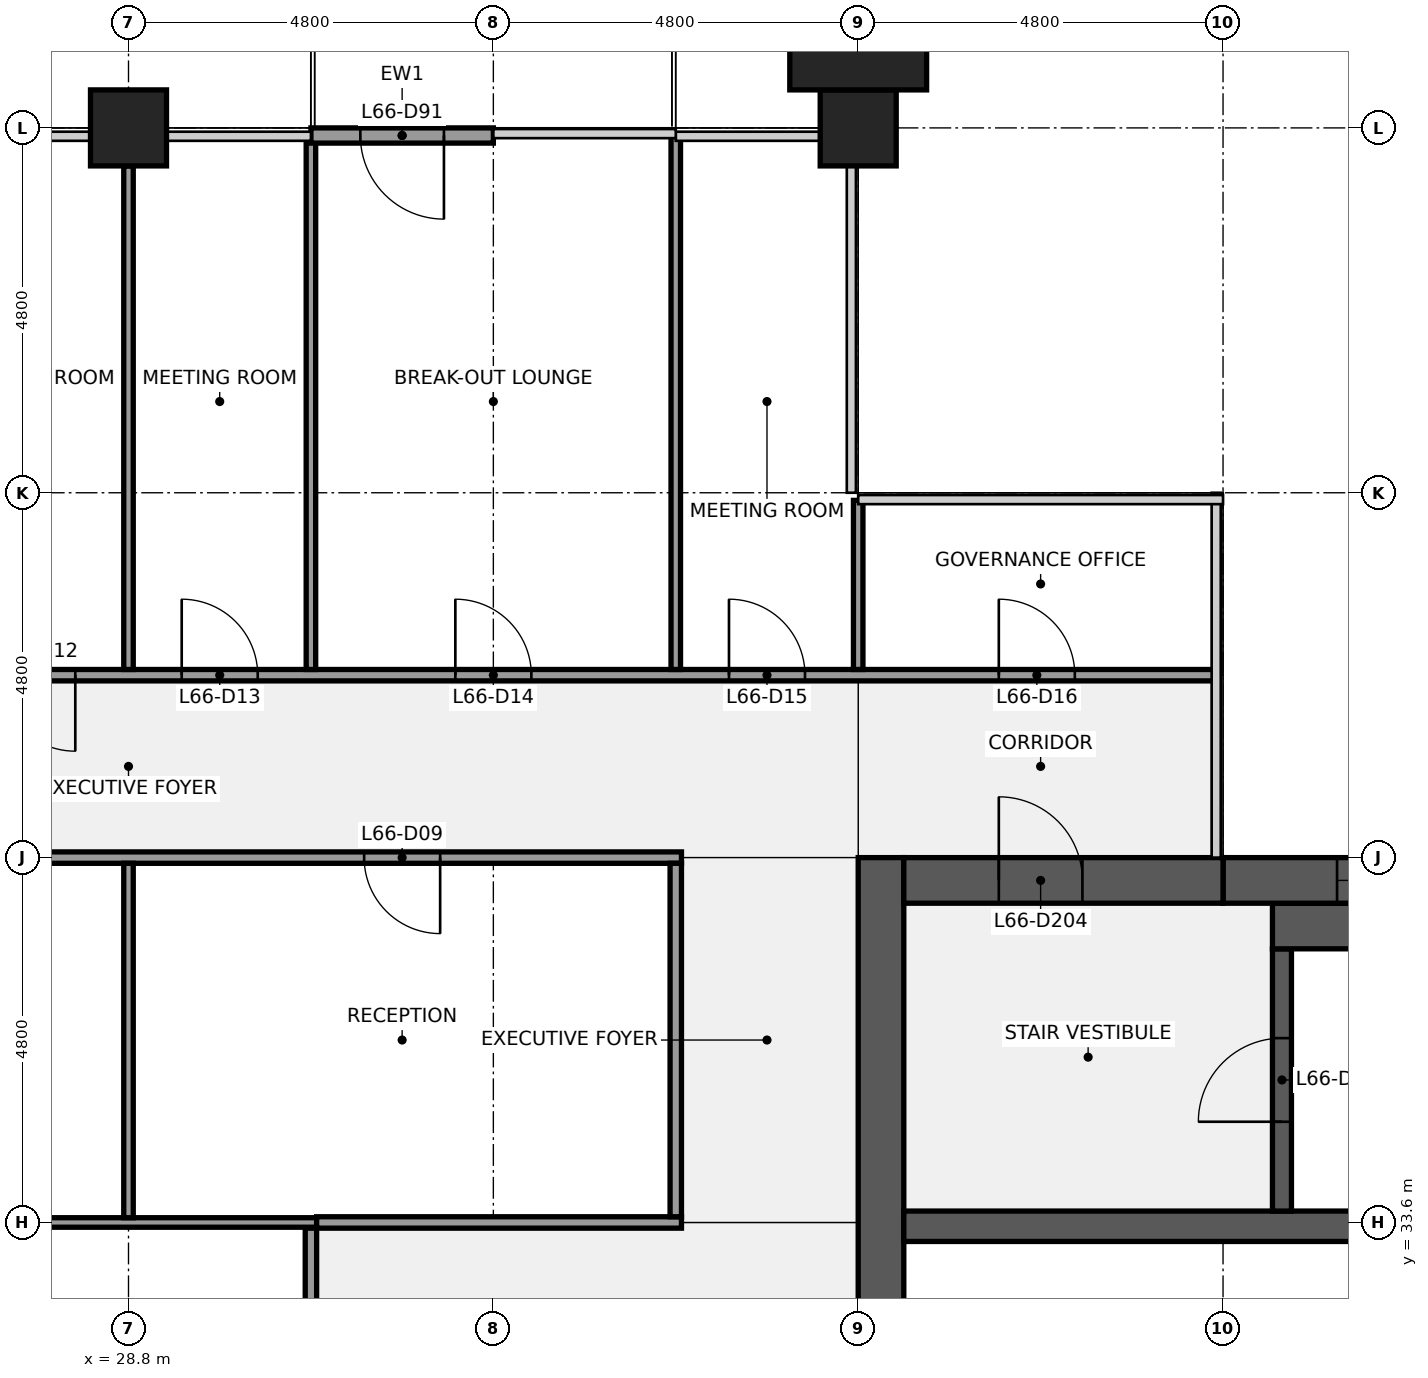
"""IFC4 building model, lengths in metres.
Left out: names, types, materials, properties, quantities, classifications, styles, units other than length and angle.
Written with IfcOpenShell. Run it as: python <this file> out.ifc"""

import sys

from ifc_helpers import new_model, si_unit, direction, frame, frame_2d, origin, origin_2d, place, context, subcontext, project, spatial, rectangle, extrude, element, fill, save


model = new_model("IFC4")
c1 = context("Model", 3, precision=1e-05, world=origin(), true_north=direction((0.0, 1.0)))
c2 = subcontext(c1, "Body", "Model", "MODEL_VIEW")
j1 = project(units=[si_unit("LENGTHUNIT", "METRE"), si_unit("PLANEANGLEUNIT", "RADIAN")], contexts=[c1])
p1 = place(None, origin())
s1 = spatial("IfcSite", under=j1, at=p1, CompositionType="ELEMENT")
p2 = place(p1, origin())
s2 = spatial("IfcBuilding", under=s1, at=p2, CompositionType="ELEMENT")
p3 = place(p2, frame((0.0, 0.0, 302.3)))
s3 = spatial("IfcBuildingStorey", under=s2, at=p3, CompositionType="ELEMENT", Elevation=302.3)
for number, where, z_axis, x_axis in (
    (1, (28.8, 48.0, 0.0), (0.0, 0.0, 1.0), (1.0, 0.0, 0.0)),
    (2, (38.4, 48.0, 0.0), (0.0, 0.0, 1.0), (1.0, 0.0, 0.0)),
):
    element("IfcColumn", number, at=place(p3, frame(where, z_axis=z_axis, x_axis=x_axis)), inside=s3, PredefinedType="COLUMN", context=c2, shape_type="SweptSolid", body=[
        extrude(rectangle(XDim=1.0, YDim=1.0, at=origin_2d()), origin(), (0.0, 0.0, 1.0), 4.0),
    ])
p4 = place(p3, frame((38.7, 9.6, 0.0), z_axis=(0.0, 0.0, 1.0), x_axis=(0.0, 1.0, 0.0)))
e3 = element("IfcWall", 3, at=p4, inside=s3, PredefinedType="SHEAR", context=c2, shape_type="SweptSolid", body=[
    extrude(rectangle(XDim=28.8, YDim=0.6, at=frame_2d((14.4, 0.0))), origin(), (0.0, 0.0, 1.0), 3.84),
])
p5 = place(p4, frame((8.7, 0.0, 0.0)))
e4 = element("IfcOpeningElement", 4, at=p5, cuts=e3, PredefinedType="OPENING", context=c2, shape_type="SweptSolid", body=[
    extrude(rectangle(XDim=1.8, YDim=2.1, at=frame_2d((0.9, 1.05))), frame((0.0, 0.31, 0.0), z_axis=(0.0, -1.0, 0.0), x_axis=(1.0, 0.0, 0.0)), (0.0, 0.0, 1.0), 0.62),
])
p6 = place(p4, frame((18.3, 0.0, 0.0)))
e5 = element("IfcOpeningElement", 5, at=p6, cuts=e3, PredefinedType="OPENING", context=c2, shape_type="SweptSolid", body=[
    extrude(rectangle(XDim=1.8, YDim=2.1, at=frame_2d((0.9, 1.05))), frame((0.0, 0.31, 0.0), z_axis=(0.0, -1.0, 0.0), x_axis=(1.0, 0.0, 0.0)), (0.0, 0.0, 1.0), 0.62),
])
p7 = place(p3, frame((39.0, 33.55, 0.0), z_axis=(0.0, 0.0, 1.0), x_axis=(1.0, 0.0, 0.0)))
e6 = element("IfcWall", 6, at=p7, inside=s3, PredefinedType="SHEAR", context=c2, shape_type="SweptSolid", body=[
    extrude(rectangle(XDim=18.0, YDim=0.4, at=frame_2d((9.0, 0.0))), origin(), (0.0, 0.0, 1.0), 3.84),
])
p8 = place(p3, frame((43.975, 33.75, 0.0), z_axis=(0.0, 0.0, 1.0), x_axis=(0.0, 1.0, 0.0)))
e7 = element("IfcWall", 7, at=p8, inside=s3, PredefinedType="SHEAR", context=c2, shape_type="SweptSolid", body=[
    extrude(rectangle(XDim=3.45, YDim=0.25, at=frame_2d((1.725, 0.0))), origin(), (0.0, 0.0, 1.0), 3.84),
])
p9 = place(p8, frame((1.175, 0.0, 0.0)))
e8 = element("IfcOpeningElement", 8, at=p9, cuts=e7, PredefinedType="OPENING", context=c2, shape_type="SweptSolid", body=[
    extrude(rectangle(XDim=1.1, YDim=2.1, at=frame_2d((0.55, 1.05))), frame((0.0, 0.135, 0.0), z_axis=(0.0, -1.0, 0.0), x_axis=(1.0, 0.0, 0.0)), (0.0, 0.0, 1.0), 0.27),
])
p10 = place(p3, frame((43.85, 37.5, 0.0), z_axis=(0.0, 0.0, 1.0), x_axis=(1.0, 0.0, 0.0)))
e9 = element("IfcWall", 9, at=p10, inside=s3, PredefinedType="SHEAR", context=c2, shape_type="SweptSolid", body=[
    extrude(rectangle(XDim=7.5, YDim=0.6, at=frame_2d((3.75, 0.0))), origin(), (0.0, 0.0, 1.0), 3.84),
])
p11 = place(p3, frame((43.2, 38.1, 0.0), z_axis=(0.0, 0.0, 1.0), x_axis=(1.0, 0.0, 0.0)))
e10 = element("IfcWall", 10, at=p11, inside=s3, PredefinedType="SHEAR", context=c2, shape_type="SweptSolid", body=[
    extrude(rectangle(XDim=13.8, YDim=0.6, at=frame_2d((6.9, 0.0))), origin(), (0.0, 0.0, 1.0), 3.84),
])
p12 = place(p11, frame((6.3, 0.0, 0.9)))
e11 = element("IfcOpeningElement", 11, at=p12, cuts=e10, PredefinedType="OPENING", context=c2, shape_type="SweptSolid", body=[
    extrude(rectangle(XDim=1.8, YDim=1.5, at=frame_2d((0.9, 0.75))), frame((0.0, 0.31, 0.0), z_axis=(0.0, -1.0, 0.0), x_axis=(1.0, 0.0, 0.0)), (0.0, 0.0, 1.0), 0.62),
])
p13 = place(p11, frame((1.5, 0.0, 0.9)))
e12 = element("IfcOpeningElement", 12, at=p13, cuts=e10, PredefinedType="OPENING", context=c2, shape_type="SweptSolid", body=[
    extrude(rectangle(XDim=1.8, YDim=1.5, at=frame_2d((0.9, 0.75))), frame((0.0, 0.31, 0.0), z_axis=(0.0, -1.0, 0.0), x_axis=(1.0, 0.0, 0.0)), (0.0, 0.0, 1.0), 0.62),
])
p14 = place(p3, frame((39.0, 38.1, 0.0), z_axis=(0.0, 0.0, 1.0), x_axis=(1.0, 0.0, 0.0)))
e13 = element("IfcWall", 13, at=p14, inside=s3, PredefinedType="SHEAR", context=c2, shape_type="SweptSolid", body=[
    extrude(rectangle(XDim=4.2, YDim=0.6, at=frame_2d((2.1, 0.0))), origin(), (0.0, 0.0, 1.0), 3.84),
])
p15 = place(p14, frame((1.25, 0.0, 0.0)))
e14 = element("IfcOpeningElement", 14, at=p15, cuts=e13, PredefinedType="OPENING", context=c2, shape_type="SweptSolid", body=[
    extrude(rectangle(XDim=1.1, YDim=2.1, at=frame_2d((0.55, 1.05))), frame((0.0, 0.31, 0.0), z_axis=(0.0, -1.0, 0.0), x_axis=(1.0, 0.0, 0.0)), (0.0, 0.0, 1.0), 0.62),
])
p16 = place(p3, frame((26.475, 33.6, 0.0), z_axis=(0.0, 0.0, 1.0), x_axis=(1.0, 0.0, 0.0)))
e15 = element("IfcWall", 15, at=p16, inside=s3, PredefinedType="PARTITIONING", context=c2, shape_type="SweptSolid", body=[
    extrude(rectangle(XDim=4.8, YDim=0.125, at=frame_2d((2.4, 0.0))), origin(), (0.0, 0.0, 1.0), 2.87),
])
p17 = place(p3, frame((31.275, 33.6, 0.0), z_axis=(0.0, 0.0, 1.0), x_axis=(1.0, 0.0, 0.0)))
e16 = element("IfcWall", 16, at=p17, inside=s3, PredefinedType="PARTITIONING", context=c2, shape_type="SweptSolid", body=[
    extrude(rectangle(XDim=4.8, YDim=0.15, at=frame_2d((2.4, 0.0))), origin(), (0.0, 0.0, 1.0), 2.87),
])
p18 = place(p3, frame((21.525, 38.4, 0.0), z_axis=(0.0, 0.0, 1.0), x_axis=(1.0, 0.0, 0.0)))
e17 = element("IfcWall", 17, at=p18, inside=s3, PredefinedType="PARTITIONING", context=c2, shape_type="SweptSolid", body=[
    extrude(rectangle(XDim=14.55, YDim=0.15, at=frame_2d((7.275, 0.0))), origin(), (0.0, 0.0, 1.0), 2.87),
])
p19 = place(p18, frame((3.175, 0.0, 0.0)))
e18 = element("IfcOpeningElement", 18, at=p19, cuts=e17, PredefinedType="OPENING", context=c2, shape_type="SweptSolid", body=[
    extrude(rectangle(XDim=1.0, YDim=2.1, at=frame_2d((0.5, 1.05))), frame((0.0, 0.085, 0.0), z_axis=(0.0, -1.0, 0.0), x_axis=(1.0, 0.0, 0.0)), (0.0, 0.0, 1.0), 0.17),
])
p20 = place(p18, frame((10.375, 0.0, 0.0)))
e19 = element("IfcOpeningElement", 19, at=p20, cuts=e17, PredefinedType="OPENING", context=c2, shape_type="SweptSolid", body=[
    extrude(rectangle(XDim=1.0, YDim=2.1, at=frame_2d((0.5, 1.05))), frame((0.0, 0.085, 0.0), z_axis=(0.0, -1.0, 0.0), x_axis=(1.0, 0.0, 0.0)), (0.0, 0.0, 1.0), 0.17),
])
p21 = place(p3, frame((14.5, 40.8, 0.0), z_axis=(0.0, 0.0, 1.0), x_axis=(1.0, 0.0, 0.0)))
e20 = element("IfcWall", 20, at=p21, inside=s3, PredefinedType="PARTITIONING", context=c2, shape_type="SweptSolid", body=[
    extrude(rectangle(XDim=28.6, YDim=0.15, at=frame_2d((14.3, 0.0))), origin(), (0.0, 0.0, 1.0), 2.87),
])
p22 = place(p21, frame((1.85, 0.0, 0.0)))
e21 = element("IfcOpeningElement", 21, at=p22, cuts=e20, PredefinedType="OPENING", context=c2, shape_type="SweptSolid", body=[
    extrude(rectangle(XDim=1.0, YDim=2.1, at=frame_2d((0.5, 1.05))), frame((0.0, 0.085, 0.0), z_axis=(0.0, -1.0, 0.0), x_axis=(1.0, 0.0, 0.0)), (0.0, 0.0, 1.0), 0.17),
])
p23 = place(p21, frame((7.8, 0.0, 0.0)))
e22 = element("IfcOpeningElement", 22, at=p23, cuts=e20, PredefinedType="OPENING", context=c2, shape_type="SweptSolid", body=[
    extrude(rectangle(XDim=1.0, YDim=2.1, at=frame_2d((0.5, 1.05))), frame((0.0, 0.085, 0.0), z_axis=(0.0, -1.0, 0.0), x_axis=(1.0, 0.0, 0.0)), (0.0, 0.0, 1.0), 0.17),
])
p24 = place(p21, frame((12.6, 0.0, 0.0)))
e23 = element("IfcOpeningElement", 23, at=p24, cuts=e20, PredefinedType="OPENING", context=c2, shape_type="SweptSolid", body=[
    extrude(rectangle(XDim=1.0, YDim=2.1, at=frame_2d((0.5, 1.05))), frame((0.0, 0.085, 0.0), z_axis=(0.0, -1.0, 0.0), x_axis=(1.0, 0.0, 0.0)), (0.0, 0.0, 1.0), 0.17),
])
p25 = place(p21, frame((15.0, 0.0, 0.0)))
e24 = element("IfcOpeningElement", 24, at=p25, cuts=e20, PredefinedType="OPENING", context=c2, shape_type="SweptSolid", body=[
    extrude(rectangle(XDim=1.0, YDim=2.1, at=frame_2d((0.5, 1.05))), frame((0.0, 0.085, 0.0), z_axis=(0.0, -1.0, 0.0), x_axis=(1.0, 0.0, 0.0)), (0.0, 0.0, 1.0), 0.17),
])
p26 = place(p21, frame((18.6, 0.0, 0.0)))
e25 = element("IfcOpeningElement", 25, at=p26, cuts=e20, PredefinedType="OPENING", context=c2, shape_type="SweptSolid", body=[
    extrude(rectangle(XDim=1.0, YDim=2.1, at=frame_2d((0.5, 1.05))), frame((0.0, 0.085, 0.0), z_axis=(0.0, -1.0, 0.0), x_axis=(1.0, 0.0, 0.0)), (0.0, 0.0, 1.0), 0.17),
])
p27 = place(p21, frame((22.2, 0.0, 0.0)))
e26 = element("IfcOpeningElement", 26, at=p27, cuts=e20, PredefinedType="OPENING", context=c2, shape_type="SweptSolid", body=[
    extrude(rectangle(XDim=1.0, YDim=2.1, at=frame_2d((0.5, 1.05))), frame((0.0, 0.085, 0.0), z_axis=(0.0, -1.0, 0.0), x_axis=(1.0, 0.0, 0.0)), (0.0, 0.0, 1.0), 0.17),
])
p28 = place(p21, frame((25.75, 0.0, 0.0)))
e27 = element("IfcOpeningElement", 27, at=p28, cuts=e20, PredefinedType="OPENING", context=c2, shape_type="SweptSolid", body=[
    extrude(rectangle(XDim=1.0, YDim=2.1, at=frame_2d((0.5, 1.05))), frame((0.0, 0.085, 0.0), z_axis=(0.0, -1.0, 0.0), x_axis=(1.0, 0.0, 0.0)), (0.0, 0.0, 1.0), 0.17),
])
p29 = place(p3, frame((28.8, 33.663, 0.0), z_axis=(0.0, 0.0, 1.0), x_axis=(0.0, 1.0, 0.0)))
e28 = element("IfcWall", 28, at=p29, inside=s3, PredefinedType="PARTITIONING", context=c2, shape_type="SweptSolid", body=[
    extrude(rectangle(XDim=4.662, YDim=0.125, at=frame_2d((2.331, 0.0))), origin(), (0.0, 0.0, 1.0), 2.87),
])
p30 = place(p3, frame((28.8, 40.875, 0.0), z_axis=(0.0, 0.0, 1.0), x_axis=(0.0, 1.0, 0.0)))
e29 = element("IfcWall", 29, at=p30, inside=s3, PredefinedType="PARTITIONING", context=c2, shape_type="SweptSolid", body=[
    extrude(rectangle(XDim=6.625, YDim=0.125, at=frame_2d((3.312, 0.0))), origin(), (0.0, 0.0, 1.0), 2.87),
])
p31 = place(p3, frame((31.2, 40.875, 0.0), z_axis=(0.0, 0.0, 1.0), x_axis=(0.0, 1.0, 0.0)))
e30 = element("IfcWall", 30, at=p31, inside=s3, PredefinedType="PARTITIONING", context=c2, shape_type="SweptSolid", body=[
    extrude(rectangle(XDim=7.025, YDim=0.125, at=frame_2d((3.512, 0.0))), origin(), (0.0, 0.0, 1.0), 2.87),
])
p32 = place(p3, frame((31.2, 26.475, 0.0), z_axis=(0.0, 0.0, 1.0), x_axis=(0.0, 1.0, 0.0)))
e31 = element("IfcWall", 31, at=p32, inside=s3, PredefinedType="PARTITIONING", context=c2, shape_type="SweptSolid", body=[
    extrude(rectangle(XDim=7.05, YDim=0.15, at=frame_2d((3.525, 0.0))), origin(), (0.0, 0.0, 1.0), 2.87),
])
p33 = place(p3, frame((36.0, 40.875, 0.0), z_axis=(0.0, 0.0, 1.0), x_axis=(0.0, 1.0, 0.0)))
e32 = element("IfcWall", 32, at=p33, inside=s3, PredefinedType="PARTITIONING", context=c2, shape_type="SweptSolid", body=[
    extrude(rectangle(XDim=7.025, YDim=0.125, at=frame_2d((3.512, 0.0))), origin(), (0.0, 0.0, 1.0), 2.87),
])
p34 = place(p3, frame((36.0, 33.675, 0.0), z_axis=(0.0, 0.0, 1.0), x_axis=(0.0, 1.0, 0.0)))
e33 = element("IfcWall", 33, at=p34, inside=s3, PredefinedType="PARTITIONING", context=c2, shape_type="SweptSolid", body=[
    extrude(rectangle(XDim=4.65, YDim=0.15, at=frame_2d((2.325, 0.0))), origin(), (0.0, 0.0, 1.0), 2.87),
])
p35 = place(p3, frame((38.4, 40.875, 0.0), z_axis=(0.0, 0.0, 1.0), x_axis=(0.0, 1.0, 0.0)))
e34 = element("IfcWall", 34, at=p35, inside=s3, PredefinedType="PARTITIONING", context=c2, shape_type="SweptSolid", body=[
    extrude(rectangle(XDim=2.225, YDim=0.125, at=frame_2d((1.113, 0.0))), origin(), (0.0, 0.0, 1.0), 2.87),
])
p36 = place(p3, frame((33.6, 47.9, 0.0), z_axis=(0.0, 0.0, 1.0), x_axis=(-1.0, 0.0, 0.0)))
e35 = element("IfcWall", 35, at=p36, inside=s3, PredefinedType="SOLIDWALL", context=c2, shape_type="SweptSolid", body=[
    extrude(rectangle(XDim=2.4, YDim=0.2, at=frame_2d((1.2, 0.0))), origin(), (0.0, 0.0, 1.0), 3.314),
])
p37 = place(p36, frame((0.65, 0.0, 0.0)))
e36 = element("IfcOpeningElement", 36, at=p37, cuts=e35, PredefinedType="OPENING", context=c2, shape_type="SweptSolid", body=[
    extrude(rectangle(XDim=1.1, YDim=2.1, at=frame_2d((0.55, 1.05))), frame((0.0, 0.11, 0.0), z_axis=(0.0, -1.0, 0.0), x_axis=(1.0, 0.0, 0.0)), (0.0, 0.0, 1.0), 0.22),
])
p38 = place(p3, frame((38.4, 49.0, 0.0), z_axis=(0.0, 0.0, 1.0), x_axis=(1.0, 0.0, 0.0)))
e37 = element("IfcColumn", 37, at=p38, inside=s3, PredefinedType="PILASTER", context=c2, shape_type="SweptSolid", body=[
    extrude(rectangle(XDim=1.8, YDim=1.0, at=origin_2d()), origin(), (0.0, 0.0, 1.0), 4.0),
])
p39 = place(p9, origin())
e38 = element("IfcDoor", 38, at=p39, inside=s3, OperationType="SINGLE_SWING_LEFT", PredefinedType="DOOR", context=c2, shape_type="SweptSolid", body=[
    extrude(rectangle(XDim=1.1, YDim=2.1, at=frame_2d((0.55, 1.05))), frame((0.0, 0.025, 0.0), z_axis=(0.0, -1.0, 0.0), x_axis=(1.0, 0.0, 0.0)), (0.0, 0.0, 1.0), 0.05),
])
fill(e8, e38)
p40 = place(p15, origin())
e39 = element("IfcDoor", 39, at=p40, inside=s3, OperationType="SINGLE_SWING_LEFT", PredefinedType="DOOR", context=c2, shape_type="SweptSolid", body=[
    extrude(rectangle(XDim=1.1, YDim=2.1, at=frame_2d((0.55, 1.05))), frame((0.0, 0.025, 0.0), z_axis=(0.0, -1.0, 0.0), x_axis=(1.0, 0.0, 0.0)), (0.0, 0.0, 1.0), 0.05),
])
fill(e14, e39)
p41 = place(p13, origin())
e40 = element("IfcWindow", 40, at=p41, inside=s3, PartitioningType="SINGLE_PANEL", PredefinedType="WINDOW", context=c2, shape_type="SweptSolid", body=[
    extrude(rectangle(XDim=1.8, YDim=1.5, at=frame_2d((0.9, 0.75))), frame((0.0, 0.03, 0.0), z_axis=(0.0, -1.0, 0.0), x_axis=(1.0, 0.0, 0.0)), (0.0, 0.0, 1.0), 0.06),
])
fill(e12, e40)
p42 = place(p20, origin())
e41 = element("IfcDoor", 41, at=p42, inside=s3, OperationType="SINGLE_SWING_RIGHT", PredefinedType="DOOR", context=c2, shape_type="SweptSolid", body=[
    extrude(rectangle(XDim=1.0, YDim=2.1, at=frame_2d((0.5, 1.05))), frame((0.0, 0.025, 0.0), z_axis=(0.0, -1.0, 0.0), x_axis=(1.0, 0.0, 0.0)), (0.0, 0.0, 1.0), 0.05),
])
fill(e19, e41)
p43 = place(p24, origin())
e42 = element("IfcDoor", 42, at=p43, inside=s3, OperationType="SINGLE_SWING_RIGHT", PredefinedType="DOOR", context=c2, shape_type="SweptSolid", body=[
    extrude(rectangle(XDim=1.0, YDim=2.1, at=frame_2d((0.5, 1.05))), frame((0.0, 0.025, 0.0), z_axis=(0.0, -1.0, 0.0), x_axis=(1.0, 0.0, 0.0)), (0.0, 0.0, 1.0), 0.05),
])
fill(e23, e42)
p44 = place(p25, origin())
e43 = element("IfcDoor", 43, at=p44, inside=s3, OperationType="SINGLE_SWING_LEFT", PredefinedType="DOOR", context=c2, shape_type="SweptSolid", body=[
    extrude(rectangle(XDim=1.0, YDim=2.1, at=frame_2d((0.5, 1.05))), frame((0.0, 0.025, 0.0), z_axis=(0.0, -1.0, 0.0), x_axis=(1.0, 0.0, 0.0)), (0.0, 0.0, 1.0), 0.05),
])
fill(e24, e43)
p45 = place(p26, origin())
e44 = element("IfcDoor", 44, at=p45, inside=s3, OperationType="SINGLE_SWING_LEFT", PredefinedType="DOOR", context=c2, shape_type="SweptSolid", body=[
    extrude(rectangle(XDim=1.0, YDim=2.1, at=frame_2d((0.5, 1.05))), frame((0.0, 0.025, 0.0), z_axis=(0.0, -1.0, 0.0), x_axis=(1.0, 0.0, 0.0)), (0.0, 0.0, 1.0), 0.05),
])
fill(e25, e44)
p46 = place(p27, origin())
e45 = element("IfcDoor", 45, at=p46, inside=s3, OperationType="SINGLE_SWING_LEFT", PredefinedType="DOOR", context=c2, shape_type="SweptSolid", body=[
    extrude(rectangle(XDim=1.0, YDim=2.1, at=frame_2d((0.5, 1.05))), frame((0.0, 0.025, 0.0), z_axis=(0.0, -1.0, 0.0), x_axis=(1.0, 0.0, 0.0)), (0.0, 0.0, 1.0), 0.05),
])
fill(e26, e45)
p47 = place(p28, origin())
e46 = element("IfcDoor", 46, at=p47, inside=s3, OperationType="SINGLE_SWING_LEFT", PredefinedType="DOOR", context=c2, shape_type="SweptSolid", body=[
    extrude(rectangle(XDim=1.0, YDim=2.1, at=frame_2d((0.5, 1.05))), frame((0.0, 0.025, 0.0), z_axis=(0.0, -1.0, 0.0), x_axis=(1.0, 0.0, 0.0)), (0.0, 0.0, 1.0), 0.05),
])
fill(e27, e46)
p48 = place(p37, origin())
e47 = element("IfcDoor", 47, at=p48, inside=s3, OperationType="SINGLE_SWING_LEFT", PredefinedType="DOOR", context=c2, shape_type="SweptSolid", body=[
    extrude(rectangle(XDim=1.1, YDim=2.1, at=frame_2d((0.55, 1.05))), frame((0.0, 0.025, 0.0), z_axis=(0.0, -1.0, 0.0), x_axis=(1.0, 0.0, 0.0)), (0.0, 0.0, 1.0), 0.05),
])
fill(e36, e47)
save(model, sys.argv[1])
